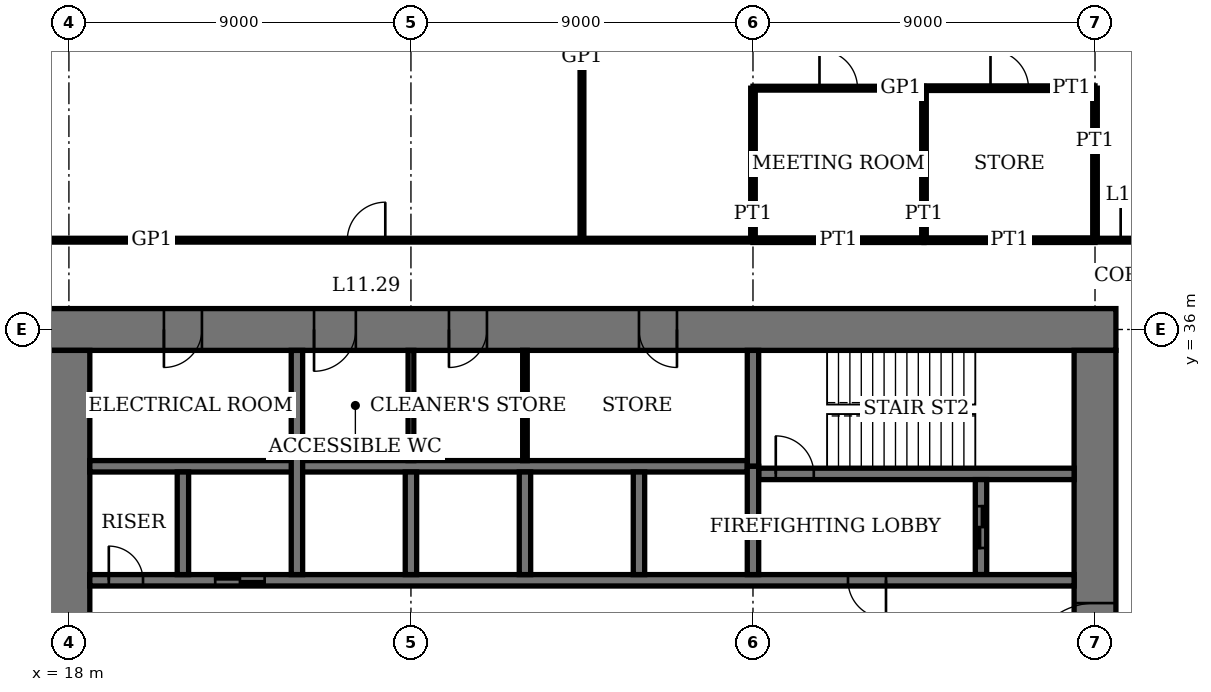
"""IFC4 building model, lengths in metres.
Left out: names, types, materials, properties, quantities, classifications, styles, units other than length and angle.
Written with IfcOpenShell. Run it as: python <this file> out.ifc"""

import sys

from ifc_helpers import new_model, si_unit, direction, frame, frame_2d, origin, place, context, subcontext, project, spatial, rectangle, extrude, element, fill, save


model = new_model("IFC4")
c1 = context("Model", 3, precision=1e-05, world=origin(), true_north=direction((0.0, 1.0)))
c2 = subcontext(c1, "Body", "Model", "MODEL_VIEW")
j1 = project(units=[si_unit("LENGTHUNIT", "METRE"), si_unit("PLANEANGLEUNIT", "RADIAN")], contexts=[c1])
p1 = place(None, origin())
s1 = spatial("IfcSite", under=j1, at=p1, CompositionType="ELEMENT")
p2 = place(p1, origin())
s2 = spatial("IfcBuilding", under=s1, at=p2, CompositionType="ELEMENT")
p3 = place(p2, frame((0.0, 0.0, 47.8)))
s3 = spatial("IfcBuildingStorey", under=s2, at=p3, CompositionType="ELEMENT", Elevation=47.8)
p4 = place(p3, frame((45.55, 36.0, 0.0), z_axis=(0.0, 0.0, 1.0), x_axis=(-1.0, 0.0, 0.0)))
e1 = element("IfcWall", 1, at=p4, inside=s3, PredefinedType="SHEAR", context=c2, shape_type="SweptSolid", body=[
    extrude(rectangle(XDim=28.1, YDim=1.1, at=frame_2d((14.05, 0.0))), origin(), (0.0, 0.0, 1.0), 4.0),
])
p5 = place(p4, frame((11.55, 0.0, 0.0)))
e2 = element("IfcOpeningElement", 2, at=p5, cuts=e1, PredefinedType="OPENING", context=c2, shape_type="SweptSolid", body=[
    extrude(rectangle(XDim=1.0, YDim=2.4, at=frame_2d((0.5, 1.2))), frame((0.0, 0.56, 0.0), z_axis=(0.0, -1.0, 0.0), x_axis=(1.0, 0.0, 0.0)), (0.0, 0.0, 1.0), 1.12),
])
p6 = place(p4, frame((16.55, 0.0, 0.0)))
e3 = element("IfcOpeningElement", 3, at=p6, cuts=e1, PredefinedType="OPENING", context=c2, shape_type="SweptSolid", body=[
    extrude(rectangle(XDim=1.0, YDim=2.4, at=frame_2d((0.5, 1.2))), frame((0.0, 0.56, 0.0), z_axis=(0.0, -1.0, 0.0), x_axis=(1.0, 0.0, 0.0)), (0.0, 0.0, 1.0), 1.12),
])
p7 = place(p4, frame((20.0, 0.0, 0.0)))
e4 = element("IfcOpeningElement", 4, at=p7, cuts=e1, PredefinedType="OPENING", context=c2, shape_type="SweptSolid", body=[
    extrude(rectangle(XDim=1.1, YDim=2.4, at=frame_2d((0.55, 1.2))), frame((0.0, 0.56, 0.0), z_axis=(0.0, -1.0, 0.0), x_axis=(1.0, 0.0, 0.0)), (0.0, 0.0, 1.0), 1.12),
])
p8 = place(p4, frame((24.05, 0.0, 0.0)))
e5 = element("IfcOpeningElement", 5, at=p8, cuts=e1, PredefinedType="OPENING", context=c2, shape_type="SweptSolid", body=[
    extrude(rectangle(XDim=1.0, YDim=2.4, at=frame_2d((0.5, 1.2))), frame((0.0, 0.56, 0.0), z_axis=(0.0, -1.0, 0.0), x_axis=(1.0, 0.0, 0.0)), (0.0, 0.0, 1.0), 1.12),
])
p9 = place(p3, frame((18.0, 35.45, 0.0), z_axis=(0.0, 0.0, 1.0), x_axis=(0.0, -1.0, 0.0)))
e6 = element("IfcWall", 6, at=p9, inside=s3, PredefinedType="SHEAR", context=c2, shape_type="SweptSolid", body=[
    extrude(rectangle(XDim=16.9, YDim=1.1, at=frame_2d((8.45, 0.0))), origin(), (0.0, 0.0, 1.0), 4.0),
])
p10 = place(p9, frame((8.45, 0.0, 0.0)))
e7 = element("IfcOpeningElement", 7, at=p10, cuts=e6, PredefinedType="OPENING", context=c2, shape_type="SweptSolid", body=[
    extrude(rectangle(XDim=1.8, YDim=2.4, at=frame_2d((0.9, 1.2))), frame((0.0, 0.56, 0.0), z_axis=(0.0, -1.0, 0.0), x_axis=(1.0, 0.0, 0.0)), (0.0, 0.0, 1.0), 1.12),
])
p11 = place(p3, frame((45.0, 18.55, 0.0), z_axis=(0.0, 0.0, 1.0), x_axis=(0.0, 1.0, 0.0)))
e8 = element("IfcWall", 8, at=p11, inside=s3, PredefinedType="SHEAR", context=c2, shape_type="SweptSolid", body=[
    extrude(rectangle(XDim=16.9, YDim=1.1, at=frame_2d((8.45, 0.0))), origin(), (0.0, 0.0, 1.0), 4.0),
])
p12 = place(p11, frame((8.45, 0.0, 0.0)))
e9 = element("IfcOpeningElement", 9, at=p12, cuts=e8, PredefinedType="OPENING", context=c2, shape_type="SweptSolid", body=[
    extrude(rectangle(XDim=1.8, YDim=2.4, at=frame_2d((0.9, 1.2))), frame((0.0, 0.56, 0.0), z_axis=(0.0, -1.0, 0.0), x_axis=(1.0, 0.0, 0.0)), (0.0, 0.0, 1.0), 1.12),
])
p13 = place(p3, frame((36.15, 32.2, 0.0), z_axis=(0.0, 0.0, 1.0), x_axis=(1.0, 0.0, 0.0)))
e10 = element("IfcWall", 10, at=p13, inside=s3, PredefinedType="SHEAR", context=c2, shape_type="SweptSolid", body=[
    extrude(rectangle(XDim=8.3, YDim=0.3, at=frame_2d((4.15, 0.0))), origin(), (0.0, 0.0, 1.0), 4.0),
])
p14 = place(p13, frame((0.45, 0.0, 0.0)))
e11 = element("IfcOpeningElement", 11, at=p14, cuts=e10, PredefinedType="OPENING", context=c2, shape_type="SweptSolid", body=[
    extrude(rectangle(XDim=1.0, YDim=2.4, at=frame_2d((0.5, 1.2))), frame((0.0, 0.16, 0.0), z_axis=(0.0, -1.0, 0.0), x_axis=(1.0, 0.0, 0.0)), (0.0, 0.0, 1.0), 0.32),
])
p15 = place(p3, frame((36.0, 32.4, 0.0), z_axis=(0.0, 0.0, 1.0), x_axis=(0.0, 1.0, 0.0)))
e12 = element("IfcWall", 12, at=p15, inside=s3, PredefinedType="SHEAR", context=c2, shape_type="SweptSolid", body=[
    extrude(rectangle(XDim=3.05, YDim=0.3, at=frame_2d((1.525, 0.0))), origin(), (0.0, 0.0, 1.0), 4.0),
])
p16 = place(p3, frame((42.0, 29.55, 0.0), z_axis=(0.0, 0.0, 1.0), x_axis=(0.0, 1.0, 0.0)))
e13 = element("IfcWall", 13, at=p16, inside=s3, PredefinedType="SHEAR", context=c2, shape_type="SweptSolid", body=[
    extrude(rectangle(XDim=2.5, YDim=0.3, at=frame_2d((1.25, 0.0))), origin(), (0.0, 0.0, 1.0), 4.0),
])
p17 = place(p16, frame((0.7, 0.0, 0.0)))
e14 = element("IfcOpeningElement", 14, at=p17, cuts=e13, PredefinedType="OPENING", context=c2, shape_type="SweptSolid", body=[
    extrude(rectangle(XDim=1.1, YDim=2.4, at=frame_2d((0.55, 1.2))), frame((0.0, 0.16, 0.0), z_axis=(0.0, -1.0, 0.0), x_axis=(1.0, 0.0, 0.0)), (0.0, 0.0, 1.0), 0.32),
])
p18 = place(p3, frame((18.55, 29.4, 0.0), z_axis=(0.0, 0.0, 1.0), x_axis=(1.0, 0.0, 0.0)))
e15 = element("IfcWall", 15, at=p18, inside=s3, PredefinedType="SHEAR", context=c2, shape_type="SweptSolid", body=[
    extrude(rectangle(XDim=25.9, YDim=0.3, at=frame_2d((12.95, 0.0))), origin(), (0.0, 0.0, 1.0), 4.0),
])
p19 = place(p18, frame((19.95, 0.0, 0.0)))
e16 = element("IfcOpeningElement", 16, at=p19, cuts=e15, PredefinedType="OPENING", context=c2, shape_type="SweptSolid", body=[
    extrude(rectangle(XDim=1.0, YDim=2.4, at=frame_2d((0.5, 1.2))), frame((0.0, 0.16, 0.0), z_axis=(0.0, -1.0, 0.0), x_axis=(1.0, 0.0, 0.0)), (0.0, 0.0, 1.0), 0.32),
])
p20 = place(p18, frame((0.5, 0.0, 0.0)))
e17 = element("IfcOpeningElement", 17, at=p20, cuts=e15, PredefinedType="OPENING", context=c2, shape_type="SweptSolid", body=[
    extrude(rectangle(XDim=0.9, YDim=2.1, at=frame_2d((0.45, 1.05))), frame((0.0, 0.16, 0.0), z_axis=(0.0, -1.0, 0.0), x_axis=(1.0, 0.0, 0.0)), (0.0, 0.0, 1.0), 0.32),
])
p21 = place(p18, frame((3.3, 0.0, 0.0)))
e18 = element("IfcOpeningElement", 18, at=p21, cuts=e15, PredefinedType="OPENING", context=c2, shape_type="SweptSolid", body=[
    extrude(rectangle(XDim=1.3, YDim=2.4, at=frame_2d((0.65, 1.2))), frame((0.0, 0.16, 0.0), z_axis=(0.0, -1.0, 0.0), x_axis=(1.0, 0.0, 0.0)), (0.0, 0.0, 1.0), 0.32),
])
p22 = place(p3, frame((18.55, 32.4, 0.0), z_axis=(0.0, 0.0, 1.0), x_axis=(1.0, 0.0, 0.0)))
e19 = element("IfcWall", 19, at=p22, inside=s3, PredefinedType="SHEAR", context=c2, shape_type="SweptSolid", body=[
    extrude(rectangle(XDim=17.3, YDim=0.3, at=frame_2d((8.65, 0.0))), origin(), (0.0, 0.0, 1.0), 4.0),
])
for number, where, z_axis, x_axis in (
    (20, (33.0, 29.55, 0.0), (0.0, 0.0, 1.0), (0.0, 1.0, 0.0)),
    (21, (30.0, 29.55, 0.0), (0.0, 0.0, 1.0), (0.0, 1.0, 0.0)),
    (22, (27.0, 29.55, 0.0), (0.0, 0.0, 1.0), (0.0, 1.0, 0.0)),
):
    element("IfcWall", number, at=place(p3, frame(where, z_axis=z_axis, x_axis=x_axis)), inside=s3, PredefinedType="SHEAR", context=c2, shape_type="SweptSolid", body=[
        extrude(rectangle(XDim=2.7, YDim=0.3, at=frame_2d((1.35, 0.0))), origin(), (0.0, 0.0, 1.0), 4.0),
    ])
p23 = place(p3, frame((24.0, 29.55, 0.0), z_axis=(0.0, 0.0, 1.0), x_axis=(0.0, 1.0, 0.0)))
e23 = element("IfcWall", 23, at=p23, inside=s3, PredefinedType="SHEAR", context=c2, shape_type="SweptSolid", body=[
    extrude(rectangle(XDim=5.9, YDim=0.3, at=frame_2d((2.95, 0.0))), origin(), (0.0, 0.0, 1.0), 4.0),
])
p24 = place(p3, frame((21.0, 29.55, 0.0), z_axis=(0.0, 0.0, 1.0), x_axis=(0.0, 1.0, 0.0)))
e24 = element("IfcWall", 24, at=p24, inside=s3, PredefinedType="SHEAR", context=c2, shape_type="SweptSolid", body=[
    extrude(rectangle(XDim=2.7, YDim=0.3, at=frame_2d((1.35, 0.0))), origin(), (0.0, 0.0, 1.0), 4.0),
])
p25 = place(p3, frame((36.0, 29.55, 0.0), z_axis=(0.0, 0.0, 1.0), x_axis=(0.0, 1.0, 0.0)))
e25 = element("IfcWall", 25, at=p25, inside=s3, PredefinedType="SHEAR", context=c2, shape_type="SweptSolid", body=[
    extrude(rectangle(XDim=2.85, YDim=0.3, at=frame_2d((1.425, 0.0))), origin(), (0.0, 0.0, 1.0), 4.0),
])
for number, where, z_axis, x_axis in (
    (26, (36.0, 38.35, 0.0), (0.0, 0.0, 1.0), (1.0, 0.0, 0.0)),
    (27, (40.5, 38.35, 0.0), (0.0, 0.0, 1.0), (1.0, 0.0, 0.0)),
):
    element("IfcWall", number, at=place(p3, frame(where, z_axis=z_axis, x_axis=x_axis)), inside=s3, PredefinedType="PARTITIONING", context=c2, shape_type="SweptSolid", body=[
        extrude(rectangle(XDim=4.5, YDim=0.12, at=frame_2d((2.25, 0.0))), origin(), (0.0, 0.0, 1.0), 3.75),
    ])
p26 = place(p3, frame((15.65, 38.35, 0.0), z_axis=(0.0, 0.0, 1.0), x_axis=(1.0, 0.0, 0.0)))
e28 = element("IfcWall", 28, at=p26, inside=s3, PredefinedType="PARTITIONING", context=c2, shape_type="SweptSolid", body=[
    extrude(rectangle(XDim=20.35, YDim=0.1, at=frame_2d((10.175, 0.0))), origin(), (0.0, 0.0, 1.0), 3.75),
])
p27 = place(p26, frame((9.675, 0.0, 0.0)))
e29 = element("IfcOpeningElement", 29, at=p27, cuts=e28, PredefinedType="OPENING", context=c2, shape_type="SweptSolid", body=[
    extrude(rectangle(XDim=1.0, YDim=2.4, at=frame_2d((0.5, 1.2))), frame((0.0, 0.06, 0.0), z_axis=(0.0, -1.0, 0.0), x_axis=(1.0, 0.0, 0.0)), (0.0, 0.0, 1.0), 0.12),
])
p28 = place(p3, frame((45.0, 38.35, 0.0), z_axis=(0.0, 0.0, 1.0), x_axis=(1.0, 0.0, 0.0)))
e30 = element("IfcWall", 30, at=p28, inside=s3, PredefinedType="PARTITIONING", context=c2, shape_type="SweptSolid", body=[
    extrude(rectangle(XDim=2.35, YDim=0.1, at=frame_2d((1.175, 0.0))), origin(), (0.0, 0.0, 1.0), 3.75),
])
p29 = place(p28, frame((0.675, 0.0, 0.0)))
e31 = element("IfcOpeningElement", 31, at=p29, cuts=e30, PredefinedType="OPENING", context=c2, shape_type="SweptSolid", body=[
    extrude(rectangle(XDim=1.0, YDim=2.4, at=frame_2d((0.5, 1.2))), frame((0.0, 0.06, 0.0), z_axis=(0.0, -1.0, 0.0), x_axis=(1.0, 0.0, 0.0)), (0.0, 0.0, 1.0), 0.12),
])
p30 = place(p3, frame((40.5, 42.35, 0.0), z_axis=(0.0, 0.0, 1.0), x_axis=(1.0, 0.0, 0.0)))
e32 = element("IfcWall", 32, at=p30, inside=s3, PredefinedType="PARTITIONING", context=c2, shape_type="SweptSolid", body=[
    extrude(rectangle(XDim=4.5, YDim=0.12, at=frame_2d((2.25, 0.0))), origin(), (0.0, 0.0, 1.0), 3.75),
])
p31 = place(p30, frame((1.75, 0.0, 0.0)))
e33 = element("IfcOpeningElement", 33, at=p31, cuts=e32, PredefinedType="OPENING", context=c2, shape_type="SweptSolid", body=[
    extrude(rectangle(XDim=1.0, YDim=2.4, at=frame_2d((0.5, 1.2))), frame((0.0, 0.07, 0.0), z_axis=(0.0, -1.0, 0.0), x_axis=(1.0, 0.0, 0.0)), (0.0, 0.0, 1.0), 0.14),
])
p32 = place(p3, frame((36.0, 42.35, 0.0), z_axis=(0.0, 0.0, 1.0), x_axis=(1.0, 0.0, 0.0)))
e34 = element("IfcWall", 34, at=p32, inside=s3, PredefinedType="PARTITIONING", context=c2, shape_type="SweptSolid", body=[
    extrude(rectangle(XDim=4.5, YDim=0.1, at=frame_2d((2.25, 0.0))), origin(), (0.0, 0.0, 1.0), 3.75),
])
p33 = place(p32, frame((1.75, 0.0, 0.0)))
e35 = element("IfcOpeningElement", 35, at=p33, cuts=e34, PredefinedType="OPENING", context=c2, shape_type="SweptSolid", body=[
    extrude(rectangle(XDim=1.0, YDim=2.4, at=frame_2d((0.5, 1.2))), frame((0.0, 0.06, 0.0), z_axis=(0.0, -1.0, 0.0), x_axis=(1.0, 0.0, 0.0)), (0.0, 0.0, 1.0), 0.12),
])
p34 = place(p3, frame((31.5, 38.35, 0.0), z_axis=(0.0, 0.0, 1.0), x_axis=(0.0, 1.0, 0.0)))
e36 = element("IfcWall", 36, at=p34, inside=s3, PredefinedType="PARTITIONING", context=c2, shape_type="SweptSolid", body=[
    extrude(rectangle(XDim=10.26, YDim=0.1, at=frame_2d((5.13, 0.0))), origin(), (0.0, 0.0, 1.0), 3.75),
])
p35 = place(p3, frame((36.0, 38.35, 0.0), z_axis=(0.0, 0.0, 1.0), x_axis=(0.0, 1.0, 0.0)))
e37 = element("IfcWall", 37, at=p35, inside=s3, PredefinedType="PARTITIONING", context=c2, shape_type="SweptSolid", body=[
    extrude(rectangle(XDim=4.0, YDim=0.12, at=frame_2d((2.0, 0.0))), origin(), (0.0, 0.0, 1.0), 3.05),
])
p36 = place(p3, frame((40.5, 38.35, 0.0), z_axis=(0.0, 0.0, 1.0), x_axis=(0.0, 1.0, 0.0)))
e38 = element("IfcWall", 38, at=p36, inside=s3, PredefinedType="PARTITIONING", context=c2, shape_type="SweptSolid", body=[
    extrude(rectangle(XDim=4.0, YDim=0.12, at=frame_2d((2.0, 0.0))), origin(), (0.0, 0.0, 1.0), 3.75),
])
p37 = place(p3, frame((45.0, 38.35, 0.0), z_axis=(0.0, 0.0, 1.0), x_axis=(0.0, 1.0, 0.0)))
e39 = element("IfcWall", 39, at=p37, inside=s3, PredefinedType="PARTITIONING", context=c2, shape_type="SweptSolid", body=[
    extrude(rectangle(XDim=4.0, YDim=0.12, at=frame_2d((2.0, 0.0))), origin(), (0.0, 0.0, 1.0), 3.05),
])
p38 = place(p3, frame((30.0, 32.55, 0.0), z_axis=(0.0, 0.0, 1.0), x_axis=(0.0, 1.0, 0.0)))
e40 = element("IfcWall", 40, at=p38, inside=s3, PredefinedType="PARTITIONING", context=c2, shape_type="SweptSolid", body=[
    extrude(rectangle(XDim=2.9, YDim=0.12, at=frame_2d((1.45, 0.0))), origin(), (0.0, 0.0, 1.0), 3.75),
])
p39 = place(p3, frame((27.0, 32.55, 0.0), z_axis=(0.0, 0.0, 1.0), x_axis=(0.0, 1.0, 0.0)))
e41 = element("IfcWall", 41, at=p39, inside=s3, PredefinedType="PARTITIONING", context=c2, shape_type="SweptSolid", body=[
    extrude(rectangle(XDim=2.9, YDim=0.15, at=frame_2d((1.45, 0.0))), origin(), (0.0, 0.0, 1.0), 3.75),
])
p40 = place(p12, origin())
e42 = element("IfcDoor", 42, at=p40, inside=s3, OperationType="DOUBLE_DOOR_DOUBLE_SWING", PredefinedType="DOOR", context=c2, shape_type="SweptSolid", body=[
    extrude(rectangle(XDim=1.8, YDim=2.4, at=frame_2d((0.9, 1.2))), frame((0.0, 0.03, 0.0), z_axis=(0.0, -1.0, 0.0), x_axis=(1.0, 0.0, 0.0)), (0.0, 0.0, 1.0), 0.06),
    extrude(rectangle(XDim=0.04, YDim=2.4, at=frame_2d((0.02, 1.2))), frame((0.0, 0.55, 0.0), z_axis=(0.0, -1.0, 0.0), x_axis=(1.0, 0.0, 0.0)), (0.0, 0.0, 1.0), 1.1),
    extrude(rectangle(XDim=0.04, YDim=2.4, at=frame_2d((1.78, 1.2))), frame((0.0, 0.55, 0.0), z_axis=(0.0, -1.0, 0.0), x_axis=(1.0, 0.0, 0.0)), (0.0, 0.0, 1.0), 1.1),
    extrude(rectangle(XDim=1.8, YDim=0.04, at=frame_2d((0.9, 2.38))), frame((0.0, 0.55, 0.0), z_axis=(0.0, -1.0, 0.0), x_axis=(1.0, 0.0, 0.0)), (0.0, 0.0, 1.0), 1.1),
])
fill(e9, e42)
p41 = place(p5, origin())
e43 = element("IfcDoor", 43, at=p41, inside=s3, OperationType="SINGLE_SWING_RIGHT", PredefinedType="DOOR", context=c2, shape_type="SweptSolid", body=[
    extrude(rectangle(XDim=1.0, YDim=2.4, at=frame_2d((0.5, 1.2))), frame((0.0, 0.025, 0.0), z_axis=(0.0, -1.0, 0.0), x_axis=(1.0, 0.0, 0.0)), (0.0, 0.0, 1.0), 0.05),
    extrude(rectangle(XDim=0.04, YDim=2.4, at=frame_2d((0.02, 1.2))), frame((0.0, 0.4, 0.0), z_axis=(0.0, -1.0, 0.0), x_axis=(1.0, 0.0, 0.0)), (0.0, 0.0, 1.0), 0.8),
    extrude(rectangle(XDim=0.04, YDim=2.4, at=frame_2d((0.98, 1.2))), frame((0.0, 0.4, 0.0), z_axis=(0.0, -1.0, 0.0), x_axis=(1.0, 0.0, 0.0)), (0.0, 0.0, 1.0), 0.8),
    extrude(rectangle(XDim=1.0, YDim=0.04, at=frame_2d((0.5, 2.38))), frame((0.0, 0.4, 0.0), z_axis=(0.0, -1.0, 0.0), x_axis=(1.0, 0.0, 0.0)), (0.0, 0.0, 1.0), 0.8),
])
fill(e2, e43)
p42 = place(p6, origin())
e44 = element("IfcDoor", 44, at=p42, inside=s3, OperationType="SINGLE_SWING_LEFT", PredefinedType="DOOR", context=c2, shape_type="SweptSolid", body=[
    extrude(rectangle(XDim=1.0, YDim=2.4, at=frame_2d((0.5, 1.2))), frame((0.0, 0.025, 0.0), z_axis=(0.0, -1.0, 0.0), x_axis=(1.0, 0.0, 0.0)), (0.0, 0.0, 1.0), 0.05),
    extrude(rectangle(XDim=0.04, YDim=2.4, at=frame_2d((0.02, 1.2))), frame((0.0, 0.4, 0.0), z_axis=(0.0, -1.0, 0.0), x_axis=(1.0, 0.0, 0.0)), (0.0, 0.0, 1.0), 0.8),
    extrude(rectangle(XDim=0.04, YDim=2.4, at=frame_2d((0.98, 1.2))), frame((0.0, 0.4, 0.0), z_axis=(0.0, -1.0, 0.0), x_axis=(1.0, 0.0, 0.0)), (0.0, 0.0, 1.0), 0.8),
    extrude(rectangle(XDim=1.0, YDim=0.04, at=frame_2d((0.5, 2.38))), frame((0.0, 0.4, 0.0), z_axis=(0.0, -1.0, 0.0), x_axis=(1.0, 0.0, 0.0)), (0.0, 0.0, 1.0), 0.8),
])
fill(e3, e44)
p43 = place(p7, origin())
e45 = element("IfcDoor", 45, at=p43, inside=s3, OperationType="SINGLE_SWING_LEFT", PredefinedType="DOOR", context=c2, shape_type="SweptSolid", body=[
    extrude(rectangle(XDim=1.1, YDim=2.4, at=frame_2d((0.55, 1.2))), frame((0.0, 0.025, 0.0), z_axis=(0.0, -1.0, 0.0), x_axis=(1.0, 0.0, 0.0)), (0.0, 0.0, 1.0), 0.05),
    extrude(rectangle(XDim=0.04, YDim=2.4, at=frame_2d((0.02, 1.2))), frame((0.0, 0.44, 0.0), z_axis=(0.0, -1.0, 0.0), x_axis=(1.0, 0.0, 0.0)), (0.0, 0.0, 1.0), 0.88),
    extrude(rectangle(XDim=0.04, YDim=2.4, at=frame_2d((1.08, 1.2))), frame((0.0, 0.44, 0.0), z_axis=(0.0, -1.0, 0.0), x_axis=(1.0, 0.0, 0.0)), (0.0, 0.0, 1.0), 0.88),
    extrude(rectangle(XDim=1.1, YDim=0.04, at=frame_2d((0.55, 2.38))), frame((0.0, 0.44, 0.0), z_axis=(0.0, -1.0, 0.0), x_axis=(1.0, 0.0, 0.0)), (0.0, 0.0, 1.0), 0.88),
])
fill(e4, e45)
p44 = place(p8, origin())
e46 = element("IfcDoor", 46, at=p44, inside=s3, OperationType="SINGLE_SWING_LEFT", PredefinedType="DOOR", context=c2, shape_type="SweptSolid", body=[
    extrude(rectangle(XDim=1.0, YDim=2.4, at=frame_2d((0.5, 1.2))), frame((0.0, 0.025, 0.0), z_axis=(0.0, -1.0, 0.0), x_axis=(1.0, 0.0, 0.0)), (0.0, 0.0, 1.0), 0.05),
    extrude(rectangle(XDim=0.04, YDim=2.4, at=frame_2d((0.02, 1.2))), frame((0.0, 0.4, 0.0), z_axis=(0.0, -1.0, 0.0), x_axis=(1.0, 0.0, 0.0)), (0.0, 0.0, 1.0), 0.8),
    extrude(rectangle(XDim=0.04, YDim=2.4, at=frame_2d((0.98, 1.2))), frame((0.0, 0.4, 0.0), z_axis=(0.0, -1.0, 0.0), x_axis=(1.0, 0.0, 0.0)), (0.0, 0.0, 1.0), 0.8),
    extrude(rectangle(XDim=1.0, YDim=0.04, at=frame_2d((0.5, 2.38))), frame((0.0, 0.4, 0.0), z_axis=(0.0, -1.0, 0.0), x_axis=(1.0, 0.0, 0.0)), (0.0, 0.0, 1.0), 0.8),
])
fill(e5, e46)
p45 = place(p14, origin())
e47 = element("IfcDoor", 47, at=p45, inside=s3, OperationType="SINGLE_SWING_RIGHT", PredefinedType="DOOR", context=c2, shape_type="SweptSolid", body=[
    extrude(rectangle(XDim=1.0, YDim=2.4, at=frame_2d((0.5, 1.2))), frame((0.0, 0.03, 0.0), z_axis=(0.0, -1.0, 0.0), x_axis=(1.0, 0.0, 0.0)), (0.0, 0.0, 1.0), 0.06),
])
fill(e11, e47)
p46 = place(p19, origin())
e48 = element("IfcDoor", 48, at=p46, inside=s3, OperationType="SINGLE_SWING_RIGHT", PredefinedType="DOOR", context=c2, shape_type="SweptSolid", body=[
    extrude(rectangle(XDim=1.0, YDim=2.4, at=frame_2d((0.5, 1.2))), frame((0.0, 0.03, 0.0), z_axis=(0.0, -1.0, 0.0), x_axis=(1.0, 0.0, 0.0)), (0.0, 0.0, 1.0), 0.06),
])
fill(e16, e48)
p47 = place(p20, origin())
e49 = element("IfcDoor", 49, at=p47, inside=s3, OperationType="SINGLE_SWING_RIGHT", PredefinedType="DOOR", context=c2, shape_type="SweptSolid", body=[
    extrude(rectangle(XDim=0.9, YDim=2.1, at=frame_2d((0.45, 1.05))), frame((0.0, 0.03, 0.0), z_axis=(0.0, -1.0, 0.0), x_axis=(1.0, 0.0, 0.0)), (0.0, 0.0, 1.0), 0.06),
])
fill(e17, e49)
p48 = place(p27, origin())
e50 = element("IfcDoor", 50, at=p48, inside=s3, OperationType="SINGLE_SWING_LEFT", PredefinedType="DOOR", context=c2, shape_type="SweptSolid", body=[
    extrude(rectangle(XDim=1.0, YDim=2.4, at=frame_2d((0.5, 1.2))), frame((0.0, 0.02, 0.0), z_axis=(0.0, -1.0, 0.0), x_axis=(1.0, 0.0, 0.0)), (0.0, 0.0, 1.0), 0.04),
])
fill(e29, e50)
p49 = place(p29, origin())
e51 = element("IfcDoor", 51, at=p49, inside=s3, OperationType="SINGLE_SWING_RIGHT", PredefinedType="DOOR", context=c2, shape_type="SweptSolid", body=[
    extrude(rectangle(XDim=1.0, YDim=2.4, at=frame_2d((0.5, 1.2))), frame((0.0, 0.02, 0.0), z_axis=(0.0, -1.0, 0.0), x_axis=(1.0, 0.0, 0.0)), (0.0, 0.0, 1.0), 0.04),
])
fill(e31, e51)
p50 = place(p31, origin())
e52 = element("IfcDoor", 52, at=p50, inside=s3, OperationType="SINGLE_SWING_RIGHT", PredefinedType="DOOR", context=c2, shape_type="SweptSolid", body=[
    extrude(rectangle(XDim=1.0, YDim=2.4, at=frame_2d((0.5, 1.2))), frame((0.0, 0.025, 0.0), z_axis=(0.0, -1.0, 0.0), x_axis=(1.0, 0.0, 0.0)), (0.0, 0.0, 1.0), 0.05),
])
fill(e33, e52)
p51 = place(p33, origin())
e53 = element("IfcDoor", 53, at=p51, inside=s3, OperationType="SINGLE_SWING_RIGHT", PredefinedType="DOOR", context=c2, shape_type="SweptSolid", body=[
    extrude(rectangle(XDim=1.0, YDim=2.4, at=frame_2d((0.5, 1.2))), frame((0.0, 0.02, 0.0), z_axis=(0.0, -1.0, 0.0), x_axis=(1.0, 0.0, 0.0)), (0.0, 0.0, 1.0), 0.04),
])
fill(e35, e53)
p52 = place(p21, origin())
e54 = element("IfcDoor", 54, at=p52, inside=s3, OperationType="DOUBLE_DOOR_SLIDING", PredefinedType="DOOR", context=c2, shape_type="SweptSolid", body=[
    extrude(rectangle(XDim=1.3, YDim=2.4, at=frame_2d((0.65, 1.2))), frame((0.0, 0.02, 0.0), z_axis=(0.0, -1.0, 0.0), x_axis=(1.0, 0.0, 0.0)), (0.0, 0.0, 1.0), 0.04),
])
fill(e18, e54)
p53 = place(p17, origin())
e55 = element("IfcDoor", 55, at=p53, inside=s3, OperationType="DOUBLE_DOOR_SLIDING", PredefinedType="DOOR", context=c2, shape_type="SweptSolid", body=[
    extrude(rectangle(XDim=1.1, YDim=2.4, at=frame_2d((0.55, 1.2))), frame((0.0, 0.03, 0.0), z_axis=(0.0, -1.0, 0.0), x_axis=(1.0, 0.0, 0.0)), (0.0, 0.0, 1.0), 0.06),
])
fill(e14, e55)
save(model, sys.argv[1])
